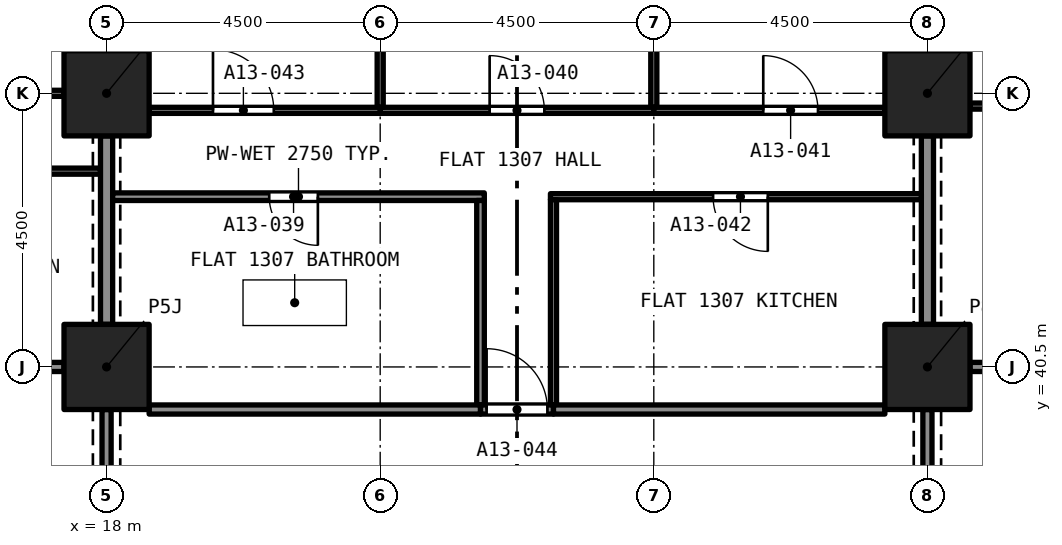
"""IFC4 building model, lengths in metres.
Left out: names, types, materials, properties, quantities, classifications, styles, units other than length and angle.
Written with IfcOpenShell. Run it as: python <this file> out.ifc"""

import sys

from ifc_helpers import new_model, si_unit, direction, frame, frame_2d, origin, origin_2d, place, context, subcontext, project, spatial, rectangle, extrude, element, fill, save


model = new_model("IFC4")
c1 = context("Model", 3, precision=1e-05, world=origin(), true_north=direction((0.0, 1.0)))
c2 = subcontext(c1, "Body", "Model", "MODEL_VIEW")
j1 = project(units=[si_unit("LENGTHUNIT", "METRE"), si_unit("PLANEANGLEUNIT", "RADIAN")], contexts=[c1])
p1 = place(None, origin())
s1 = spatial("IfcSite", under=j1, at=p1, CompositionType="ELEMENT")
p2 = place(p1, origin())
s2 = spatial("IfcBuilding", under=s1, at=p2, CompositionType="ELEMENT")
p3 = place(p2, frame((0.0, 0.0, 52.8)))
s3 = spatial("IfcBuildingStorey", under=s2, at=p3, CompositionType="ELEMENT", Elevation=52.8)
for number, where, z_axis, x_axis in (
    (1, (18.0, 40.5, 0.0), (0.0, 0.0, 1.0), (1.0, 0.0, 0.0)),
    (2, (31.5, 40.5, 0.0), (0.0, 0.0, 1.0), (1.0, 0.0, 0.0)),
    (3, (18.0, 45.0, 0.0), (0.0, 0.0, 1.0), (1.0, 0.0, 0.0)),
    (4, (31.5, 45.0, 0.0), (0.0, 0.0, 1.0), (1.0, 0.0, 0.0)),
):
    element("IfcColumn", number, at=place(p3, frame(where, z_axis=z_axis, x_axis=x_axis)), inside=s3, PredefinedType="COLUMN", context=c2, shape_type="SweptSolid", body=[
        extrude(rectangle(XDim=1.4, YDim=1.4, at=origin_2d()), origin(), (0.0, 0.0, 1.0), 3.2),
    ])
p4 = place(p3, frame((13.5, 45.0, 0.0), z_axis=(0.0, 0.0, 1.0), x_axis=(1.0, 0.0, 0.0)))
e5 = element("IfcWall", 5, at=p4, inside=s3, PredefinedType="PARTITIONING", context=c2, shape_type="SweptSolid", body=[
    extrude(rectangle(XDim=3.8, YDim=0.1, at=frame_2d((1.9, 0.0))), origin(), (0.0, 0.0, 1.0), 2.9),
])
p5 = place(p4, frame((1.8, 0.0, 0.0)))
e6 = element("IfcOpeningElement", 6, at=p5, cuts=e5, PredefinedType="OPENING", context=c2, shape_type="SweptSolid", body=[
    extrude(rectangle(XDim=0.9, YDim=2.1, at=frame_2d((0.45, 1.05))), frame((0.0, 0.06, 0.0), z_axis=(0.0, -1.0, 0.0), x_axis=(1.0, 0.0, 0.0)), (0.0, 0.0, 1.0), 0.12),
])
p6 = place(p3, frame((17.9, 43.72, 0.0), z_axis=(0.0, 0.0, 1.0), x_axis=(-1.0, 0.0, 0.0)))
e7 = element("IfcWall", 7, at=p6, inside=s3, PredefinedType="PARTITIONING", context=c2, shape_type="SweptSolid", body=[
    extrude(rectangle(XDim=6.255, YDim=0.1, at=frame_2d((3.127, 0.0))), origin(), (0.0, 0.0, 1.0), 2.9),
])
p7 = place(p6, frame((2.627, 0.0, 0.0)))
e8 = element("IfcOpeningElement", 8, at=p7, cuts=e7, PredefinedType="OPENING", context=c2, shape_type="SweptSolid", body=[
    extrude(rectangle(XDim=0.9, YDim=2.1, at=frame_2d((0.45, 1.05))), frame((0.0, 0.06, 0.0), z_axis=(0.0, -1.0, 0.0), x_axis=(1.0, 0.0, 0.0)), (0.0, 0.0, 1.0), 0.12),
])
p8 = place(p3, frame((18.0, 41.2, 0.0), z_axis=(0.0, 0.0, 1.0), x_axis=(0.0, 1.0, 0.0)))
e9 = element("IfcWall", 9, at=p8, inside=s3, PredefinedType="PARTITIONING", context=c2, shape_type="SweptSolid", body=[
    extrude(rectangle(XDim=3.1, YDim=0.2, at=frame_2d((1.55, 0.0))), origin(), (0.0, 0.0, 1.0), 2.38),
])
p9 = place(p3, frame((13.5, 40.5, 0.0), z_axis=(0.0, 0.0, 1.0), x_axis=(1.0, 0.0, 0.0)))
e10 = element("IfcWall", 10, at=p9, inside=s3, PredefinedType="PARTITIONING", context=c2, shape_type="SweptSolid", body=[
    extrude(rectangle(XDim=3.8, YDim=0.15, at=frame_2d((1.9, 0.0))), origin(), (0.0, 0.0, 1.0), 2.9),
])
p10 = place(p3, frame((32.2, 44.79, 0.0), z_axis=(0.0, 0.0, 1.0), x_axis=(1.0, 0.0, 0.0)))
e11 = element("IfcWall", 11, at=p10, inside=s3, PredefinedType="PARTITIONING", context=c2, shape_type="SweptSolid", body=[
    extrude(rectangle(XDim=3.8, YDim=0.1, at=frame_2d((1.9, 0.0))), origin(), (0.0, 0.0, 1.0), 2.9),
])
p11 = place(p10, frame((1.05, 0.0, 0.0)))
e12 = element("IfcOpeningElement", 12, at=p11, cuts=e11, PredefinedType="OPENING", context=c2, shape_type="SweptSolid", body=[
    extrude(rectangle(XDim=1.0, YDim=2.1, at=frame_2d((0.5, 1.05))), frame((0.0, 0.06, 0.0), z_axis=(0.0, -1.0, 0.0), x_axis=(1.0, 0.0, 0.0)), (0.0, 0.0, 1.0), 0.12),
])
p12 = place(p3, frame((31.5, 41.2, 0.0), z_axis=(0.0, 0.0, 1.0), x_axis=(0.0, 1.0, 0.0)))
e13 = element("IfcWall", 13, at=p12, inside=s3, PredefinedType="PARTITIONING", context=c2, shape_type="SweptSolid", body=[
    extrude(rectangle(XDim=3.1, YDim=0.2, at=frame_2d((1.55, 0.0))), origin(), (0.0, 0.0, 1.0), 2.38),
])
p13 = place(p3, frame((32.2, 40.5, 0.0), z_axis=(0.0, 0.0, 1.0), x_axis=(1.0, 0.0, 0.0)))
e14 = element("IfcWall", 14, at=p13, inside=s3, PredefinedType="PARTITIONING", context=c2, shape_type="SweptSolid", body=[
    extrude(rectangle(XDim=2.15, YDim=0.15, at=frame_2d((1.075, 0.0))), origin(), (0.0, 0.0, 1.0), 2.9),
])
p14 = place(p13, frame((1.02, 0.0, 0.0)))
e15 = element("IfcOpeningElement", 15, at=p14, cuts=e14, PredefinedType="OPENING", context=c2, shape_type="SweptSolid", body=[
    extrude(rectangle(XDim=1.0, YDim=2.1, at=frame_2d((0.5, 1.05))), frame((0.0, 0.085, 0.0), z_axis=(0.0, -1.0, 0.0), x_axis=(1.0, 0.0, 0.0)), (0.0, 0.0, 1.0), 0.17),
])
p15 = place(p3, frame((24.212, 43.3, 0.0), z_axis=(0.0, 0.0, 1.0), x_axis=(-1.0, 0.0, 0.0)))
e16 = element("IfcWall", 16, at=p15, inside=s3, PredefinedType="PARTITIONING", context=c2, shape_type="SweptSolid", body=[
    extrude(rectangle(XDim=6.112, YDim=0.125, at=frame_2d((3.056, 0.0))), origin(), (0.0, 0.0, 1.0), 2.75),
])
p16 = place(p15, frame((2.738, 0.0, 0.0)))
e17 = element("IfcOpeningElement", 17, at=p16, cuts=e16, PredefinedType="OPENING", context=c2, shape_type="SweptSolid", body=[
    extrude(rectangle(XDim=0.8, YDim=2.1, at=frame_2d((0.4, 1.05))), frame((0.0, 0.073, 0.0), z_axis=(0.0, -1.0, 0.0), x_axis=(1.0, 0.0, 0.0)), (0.0, 0.0, 1.0), 0.145),
])
p17 = place(p3, frame((24.15, 39.875, 0.0), z_axis=(0.0, 0.0, 1.0), x_axis=(0.0, 1.0, 0.0)))
e18 = element("IfcWall", 18, at=p17, inside=s3, PredefinedType="PARTITIONING", context=c2, shape_type="SweptSolid", body=[
    extrude(rectangle(XDim=3.363, YDim=0.125, at=frame_2d((1.681, 0.0))), origin(), (0.0, 0.0, 1.0), 2.75),
])
p18 = place(p3, frame((18.7, 39.8, 0.0), z_axis=(0.0, 0.0, 1.0), x_axis=(1.0, 0.0, 0.0)))
e19 = element("IfcWall", 19, at=p18, inside=s3, PredefinedType="PARTITIONING", context=c2, shape_type="SweptSolid", body=[
    extrude(rectangle(XDim=5.45, YDim=0.15, at=frame_2d((2.725, 0.0))), origin(), (0.0, 0.0, 1.0), 2.75),
])
p19 = place(p3, frame((27.0, 44.77, 0.0), z_axis=(0.0, 0.0, 1.0), x_axis=(0.0, 1.0, 0.0)))
e20 = element("IfcWall", 20, at=p19, inside=s3, PredefinedType="PARTITIONING", context=c2, shape_type="SweptSolid", body=[
    extrude(rectangle(XDim=4.03, YDim=0.1, at=frame_2d((2.015, 0.0))), origin(), (0.0, 0.0, 1.0), 2.75),
])
p20 = place(p3, frame((22.5, 44.72, 0.0), z_axis=(0.0, 0.0, 1.0), x_axis=(1.0, 0.0, 0.0)))
e21 = element("IfcWall", 21, at=p20, inside=s3, PredefinedType="PARTITIONING", context=c2, shape_type="SweptSolid", body=[
    extrude(rectangle(XDim=4.5, YDim=0.1, at=frame_2d((2.25, 0.0))), origin(), (0.0, 0.0, 1.0), 2.75),
])
p21 = place(p20, frame((1.8, 0.0, 0.0)))
e22 = element("IfcOpeningElement", 22, at=p21, cuts=e21, PredefinedType="OPENING", context=c2, shape_type="SweptSolid", body=[
    extrude(rectangle(XDim=0.9, YDim=2.1, at=frame_2d((0.45, 1.05))), frame((0.0, 0.06, 0.0), z_axis=(0.0, -1.0, 0.0), x_axis=(1.0, 0.0, 0.0)), (0.0, 0.0, 1.0), 0.12),
])
p22 = place(p3, frame((22.5, 44.77, 0.0), z_axis=(0.0, 0.0, 1.0), x_axis=(0.0, 1.0, 0.0)))
e23 = element("IfcWall", 23, at=p22, inside=s3, PredefinedType="PARTITIONING", context=c2, shape_type="SweptSolid", body=[
    extrude(rectangle(XDim=4.03, YDim=0.1, at=frame_2d((2.015, 0.0))), origin(), (0.0, 0.0, 1.0), 2.75),
])
p23 = place(p3, frame((27.0, 44.72, 0.0), z_axis=(0.0, 0.0, 1.0), x_axis=(1.0, 0.0, 0.0)))
e24 = element("IfcWall", 24, at=p23, inside=s3, PredefinedType="PARTITIONING", context=c2, shape_type="SweptSolid", body=[
    extrude(rectangle(XDim=3.8, YDim=0.1, at=frame_2d((1.9, 0.0))), origin(), (0.0, 0.0, 1.0), 2.75),
])
p24 = place(p23, frame((1.8, 0.0, 0.0)))
e25 = element("IfcOpeningElement", 25, at=p24, cuts=e24, PredefinedType="OPENING", context=c2, shape_type="SweptSolid", body=[
    extrude(rectangle(XDim=0.9, YDim=2.1, at=frame_2d((0.45, 1.05))), frame((0.0, 0.06, 0.0), z_axis=(0.0, -1.0, 0.0), x_axis=(1.0, 0.0, 0.0)), (0.0, 0.0, 1.0), 0.12),
])
p25 = place(p3, frame((31.4, 43.3, 0.0), z_axis=(0.0, 0.0, 1.0), x_axis=(-1.0, 0.0, 0.0)))
e26 = element("IfcWall", 26, at=p25, inside=s3, PredefinedType="PARTITIONING", context=c2, shape_type="SweptSolid", body=[
    extrude(rectangle(XDim=6.1, YDim=0.1, at=frame_2d((3.05, 0.0))), origin(), (0.0, 0.0, 1.0), 2.75),
])
p26 = place(p25, frame((2.525, 0.0, 0.0)))
e27 = element("IfcOpeningElement", 27, at=p26, cuts=e26, PredefinedType="OPENING", context=c2, shape_type="SweptSolid", body=[
    extrude(rectangle(XDim=0.9, YDim=2.1, at=frame_2d((0.45, 1.05))), frame((0.0, 0.06, 0.0), z_axis=(0.0, -1.0, 0.0), x_axis=(1.0, 0.0, 0.0)), (0.0, 0.0, 1.0), 0.12),
])
p27 = place(p3, frame((25.35, 39.875, 0.0), z_axis=(0.0, 0.0, 1.0), x_axis=(0.0, 1.0, 0.0)))
e28 = element("IfcWall", 28, at=p27, inside=s3, PredefinedType="PARTITIONING", context=c2, shape_type="SweptSolid", body=[
    extrude(rectangle(XDim=3.375, YDim=0.1, at=frame_2d((1.688, 0.0))), origin(), (0.0, 0.0, 1.0), 2.75),
])
p28 = place(p3, frame((18.7, 44.72, 0.0), z_axis=(0.0, 0.0, 1.0), x_axis=(1.0, 0.0, 0.0)))
e29 = element("IfcWall", 29, at=p28, inside=s3, PredefinedType="PARTITIONING", context=c2, shape_type="SweptSolid", body=[
    extrude(rectangle(XDim=3.8, YDim=0.1, at=frame_2d((1.9, 0.0))), origin(), (0.0, 0.0, 1.0), 2.75),
])
p29 = place(p28, frame((1.05, 0.0, 0.0)))
e30 = element("IfcOpeningElement", 30, at=p29, cuts=e29, PredefinedType="OPENING", context=c2, shape_type="SweptSolid", body=[
    extrude(rectangle(XDim=1.0, YDim=2.1, at=frame_2d((0.5, 1.05))), frame((0.0, 0.06, 0.0), z_axis=(0.0, -1.0, 0.0), x_axis=(1.0, 0.0, 0.0)), (0.0, 0.0, 1.0), 0.12),
])
p30 = place(p3, frame((24.15, 39.8, 0.0), z_axis=(0.0, 0.0, 1.0), x_axis=(1.0, 0.0, 0.0)))
e31 = element("IfcWall", 31, at=p30, inside=s3, PredefinedType="PARTITIONING", context=c2, shape_type="SweptSolid", body=[
    extrude(rectangle(XDim=1.2, YDim=0.15, at=frame_2d((0.6, 0.0))), origin(), (0.0, 0.0, 1.0), 2.75),
])
p31 = place(p30, frame((0.1, 0.0, 0.0)))
e32 = element("IfcOpeningElement", 32, at=p31, cuts=e31, PredefinedType="OPENING", context=c2, shape_type="SweptSolid", body=[
    extrude(rectangle(XDim=1.0, YDim=2.1, at=frame_2d((0.5, 1.05))), frame((0.0, 0.085, 0.0), z_axis=(0.0, -1.0, 0.0), x_axis=(1.0, 0.0, 0.0)), (0.0, 0.0, 1.0), 0.17),
])
p32 = place(p3, frame((25.35, 39.8, 0.0), z_axis=(0.0, 0.0, 1.0), x_axis=(1.0, 0.0, 0.0)))
e33 = element("IfcWall", 33, at=p32, inside=s3, PredefinedType="PARTITIONING", context=c2, shape_type="SweptSolid", body=[
    extrude(rectangle(XDim=5.45, YDim=0.15, at=frame_2d((2.725, 0.0))), origin(), (0.0, 0.0, 1.0), 2.75),
])
p33 = place(p3, frame((31.5, 36.7, 0.0), z_axis=(0.0, 0.0, 1.0), x_axis=(0.0, 1.0, 0.0)))
e34 = element("IfcWall", 34, at=p33, inside=s3, PredefinedType="PARTITIONING", context=c2, shape_type="SweptSolid", body=[
    extrude(rectangle(XDim=3.1, YDim=0.15, at=frame_2d((1.55, 0.0))), origin(), (0.0, 0.0, 1.0), 2.38),
])
p34 = place(p33, frame((0.95, 0.0, 0.0)))
e35 = element("IfcOpeningElement", 35, at=p34, cuts=e34, PredefinedType="OPENING", context=c2, shape_type="SweptSolid", body=[
    extrude(rectangle(XDim=1.2, YDim=2.1, at=frame_2d((0.6, 1.05))), frame((0.0, 0.085, 0.0), z_axis=(0.0, -1.0, 0.0), x_axis=(1.0, 0.0, 0.0)), (0.0, 0.0, 1.0), 0.17),
])
p35 = place(p3, frame((18.0, 39.8, 0.0), z_axis=(0.0, 0.0, 1.0), x_axis=(0.0, -1.0, 0.0)))
e36 = element("IfcWall", 36, at=p35, inside=s3, PredefinedType="PARTITIONING", context=c2, shape_type="SweptSolid", body=[
    extrude(rectangle(XDim=3.1, YDim=0.15, at=frame_2d((1.55, 0.0))), origin(), (0.0, 0.0, 1.0), 2.38),
])
p36 = place(p35, frame((0.95, 0.0, 0.0)))
e37 = element("IfcOpeningElement", 37, at=p36, cuts=e36, PredefinedType="OPENING", context=c2, shape_type="SweptSolid", body=[
    extrude(rectangle(XDim=1.2, YDim=2.1, at=frame_2d((0.6, 1.05))), frame((0.0, 0.085, 0.0), z_axis=(0.0, -1.0, 0.0), x_axis=(1.0, 0.0, 0.0)), (0.0, 0.0, 1.0), 0.17),
])
p37 = place(p16, origin())
e38 = element("IfcDoor", 38, at=p37, inside=s3, OperationType="SINGLE_SWING_RIGHT", PredefinedType="DOOR", context=c2, shape_type="SweptSolid", body=[
    extrude(rectangle(XDim=0.8, YDim=2.1, at=frame_2d((0.4, 1.05))), frame((0.0, 0.025, 0.0), z_axis=(0.0, -1.0, 0.0), x_axis=(1.0, 0.0, 0.0)), (0.0, 0.0, 1.0), 0.05),
])
fill(e17, e38)
p38 = place(p21, origin())
e39 = element("IfcDoor", 39, at=p38, inside=s3, OperationType="SINGLE_SWING_LEFT", PredefinedType="DOOR", context=c2, shape_type="SweptSolid", body=[
    extrude(rectangle(XDim=0.9, YDim=2.1, at=frame_2d((0.45, 1.05))), frame((0.0, 0.025, 0.0), z_axis=(0.0, -1.0, 0.0), x_axis=(1.0, 0.0, 0.0)), (0.0, 0.0, 1.0), 0.05),
])
fill(e22, e39)
p39 = place(p24, origin())
e40 = element("IfcDoor", 40, at=p39, inside=s3, OperationType="SINGLE_SWING_RIGHT", PredefinedType="DOOR", context=c2, shape_type="SweptSolid", body=[
    extrude(rectangle(XDim=0.9, YDim=2.1, at=frame_2d((0.45, 1.05))), frame((0.0, 0.025, 0.0), z_axis=(0.0, -1.0, 0.0), x_axis=(1.0, 0.0, 0.0)), (0.0, 0.0, 1.0), 0.05),
])
fill(e25, e40)
p40 = place(p26, origin())
e41 = element("IfcDoor", 41, at=p40, inside=s3, OperationType="SINGLE_SWING_LEFT", PredefinedType="DOOR", context=c2, shape_type="SweptSolid", body=[
    extrude(rectangle(XDim=0.9, YDim=2.1, at=frame_2d((0.45, 1.05))), frame((0.0, 0.025, 0.0), z_axis=(0.0, -1.0, 0.0), x_axis=(1.0, 0.0, 0.0)), (0.0, 0.0, 1.0), 0.05),
])
fill(e27, e41)
p41 = place(p29, origin())
e42 = element("IfcDoor", 42, at=p41, inside=s3, OperationType="SINGLE_SWING_LEFT", PredefinedType="DOOR", context=c2, shape_type="SweptSolid", body=[
    extrude(rectangle(XDim=1.0, YDim=2.1, at=frame_2d((0.5, 1.05))), frame((0.0, 0.025, 0.0), z_axis=(0.0, -1.0, 0.0), x_axis=(1.0, 0.0, 0.0)), (0.0, 0.0, 1.0), 0.05),
])
fill(e30, e42)
p42 = place(p31, origin())
e43 = element("IfcDoor", 43, at=p42, inside=s3, OperationType="SINGLE_SWING_RIGHT", PredefinedType="DOOR", context=c2, shape_type="SweptSolid", body=[
    extrude(rectangle(XDim=1.0, YDim=2.1, at=frame_2d((0.5, 1.05))), frame((0.0, 0.025, 0.0), z_axis=(0.0, -1.0, 0.0), x_axis=(1.0, 0.0, 0.0)), (0.0, 0.0, 1.0), 0.05),
])
fill(e32, e43)
save(model, sys.argv[1])
